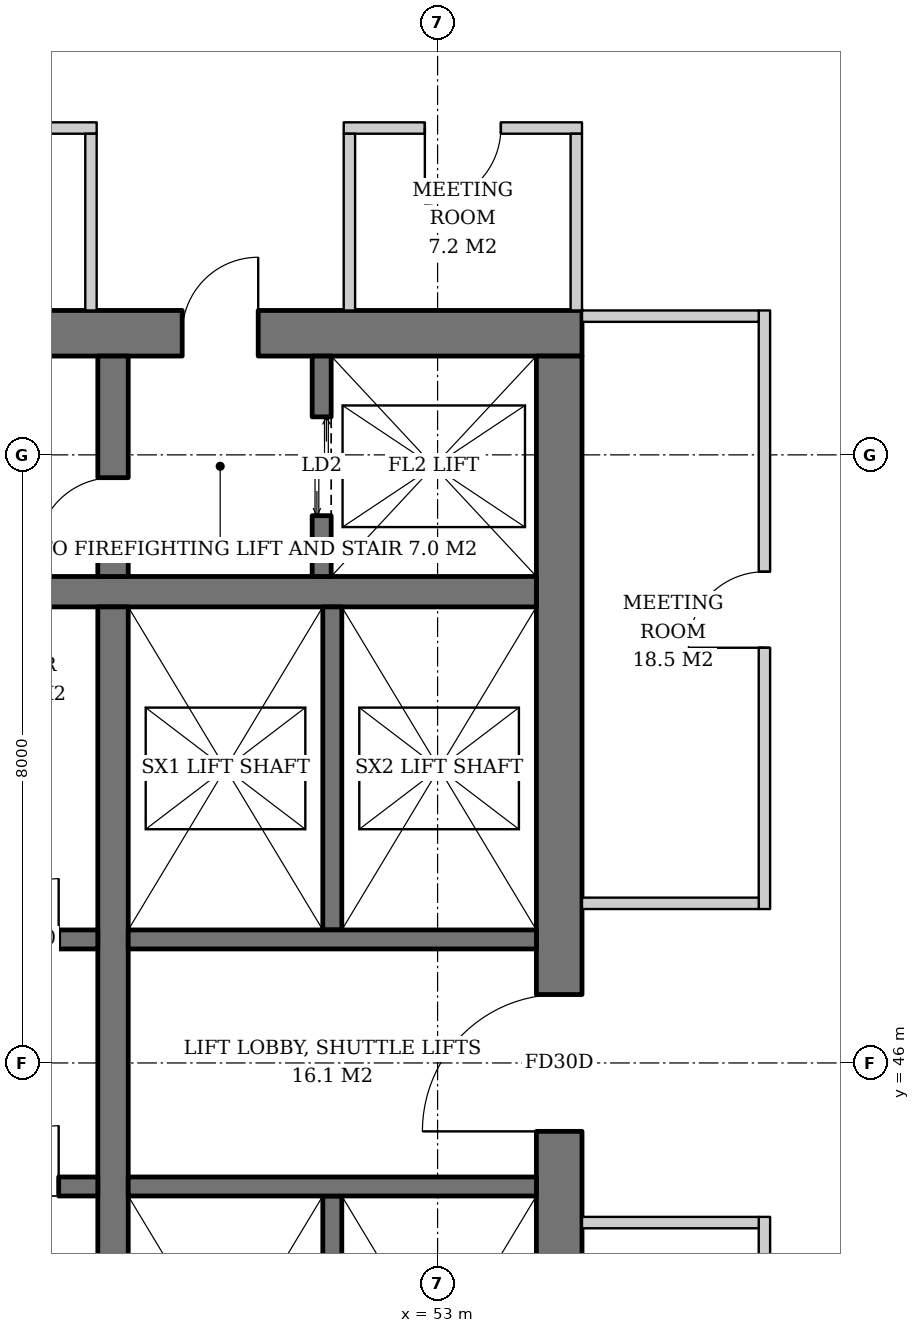
"""IFC4 building model, lengths in metres.
Left out: names, types, materials, properties, quantities, classifications, styles, units other than length and angle.
Written with IfcOpenShell. Run it as: python <this file> out.ifc"""

import sys

from ifc_helpers import new_model, si_unit, direction, frame, frame_2d, origin, place, context, subcontext, project, spatial, rectangle, extrude, element, fill, save


model = new_model("IFC4")
c1 = context("Model", 3, precision=1e-05, world=origin(), true_north=direction((0.0, 1.0)))
c2 = subcontext(c1, "Body", "Model", "MODEL_VIEW")
j1 = project(units=[si_unit("LENGTHUNIT", "METRE"), si_unit("PLANEANGLEUNIT", "RADIAN")], contexts=[c1])
p1 = place(None, origin())
s1 = spatial("IfcSite", under=j1, at=p1, CompositionType="ELEMENT")
p2 = place(p1, origin())
s2 = spatial("IfcBuilding", under=s1, at=p2, CompositionType="ELEMENT")
p3 = place(p2, frame((0.0, 0.0, 173.0)))
s3 = spatial("IfcBuildingStorey", under=s2, at=p3, CompositionType="ELEMENT", Elevation=173.0)
p4 = place(p3, frame((35.1, 55.6, 0.0), z_axis=(0.0, 0.0, 1.0), x_axis=(1.0, 0.0, 0.0)))
e1 = element("IfcWall", 1, at=p4, inside=s3, PredefinedType="SHEAR", context=c2, shape_type="SweptSolid", body=[
    extrude(rectangle(XDim=19.8, YDim=0.6, at=frame_2d((9.9, 0.0))), origin(), (0.0, 0.0, 1.0), 3.8),
])
p5 = place(p4, frame((14.54, 0.0, 0.0)))
e2 = element("IfcOpeningElement", 2, at=p5, cuts=e1, PredefinedType="OPENING", context=c2, shape_type="SweptSolid", body=[
    extrude(rectangle(XDim=1.0, YDim=2.1, at=frame_2d((0.5, 1.05))), frame((0.0, 0.31, 0.0), z_axis=(0.0, -1.0, 0.0), x_axis=(1.0, 0.0, 0.0)), (0.0, 0.0, 1.0), 0.62),
])
p6 = place(p4, frame((0.931, 0.0, 0.0)))
e3 = element("IfcOpeningElement", 3, at=p6, cuts=e1, PredefinedType="OPENING", context=c2, shape_type="SweptSolid", body=[
    extrude(rectangle(XDim=1.0, YDim=2.1, at=frame_2d((0.5, 1.05))), frame((0.0, 0.31, 0.0), z_axis=(0.0, -1.0, 0.0), x_axis=(1.0, 0.0, 0.0)), (0.0, 0.0, 1.0), 0.62),
])
p7 = place(p4, frame((2.448, 0.0, 0.0)))
e4 = element("IfcOpeningElement", 4, at=p7, cuts=e1, PredefinedType="OPENING", context=c2, shape_type="SweptSolid", body=[
    extrude(rectangle(XDim=1.0, YDim=2.1, at=frame_2d((0.5, 1.05))), frame((0.0, 0.31, 0.0), z_axis=(0.0, -1.0, 0.0), x_axis=(1.0, 0.0, 0.0)), (0.0, 0.0, 1.0), 0.62),
])
p8 = place(p4, frame((3.983, 0.0, 0.0)))
e5 = element("IfcOpeningElement", 5, at=p8, cuts=e1, PredefinedType="OPENING", context=c2, shape_type="SweptSolid", body=[
    extrude(rectangle(XDim=1.0, YDim=2.1, at=frame_2d((0.5, 1.05))), frame((0.0, 0.31, 0.0), z_axis=(0.0, -1.0, 0.0), x_axis=(1.0, 0.0, 0.0)), (0.0, 0.0, 1.0), 0.62),
])
p9 = place(p3, frame((54.6, 36.7, 0.0), z_axis=(0.0, 0.0, 1.0), x_axis=(0.0, 1.0, 0.0)))
e6 = element("IfcWall", 6, at=p9, inside=s3, PredefinedType="SHEAR", context=c2, shape_type="SweptSolid", body=[
    extrude(rectangle(XDim=18.6, YDim=0.6, at=frame_2d((9.3, 0.0))), origin(), (0.0, 0.0, 1.0), 3.8),
])
p10 = place(p9, frame((8.4, 0.0, 0.0)))
e7 = element("IfcOpeningElement", 7, at=p10, cuts=e6, PredefinedType="OPENING", context=c2, shape_type="SweptSolid", body=[
    extrude(rectangle(XDim=1.8, YDim=2.4, at=frame_2d((0.9, 1.2))), frame((0.0, 0.31, 0.0), z_axis=(0.0, -1.0, 0.0), x_axis=(1.0, 0.0, 0.0)), (0.0, 0.0, 1.0), 0.62),
])
p11 = place(p3, frame((35.7, 52.2, 0.0), z_axis=(0.0, 0.0, 1.0), x_axis=(1.0, 0.0, 0.0)))
e8 = element("IfcWall", 8, at=p11, inside=s3, PredefinedType="SHEAR", context=c2, shape_type="SweptSolid", body=[
    extrude(rectangle(XDim=18.6, YDim=0.4, at=frame_2d((9.3, 0.0))), origin(), (0.0, 0.0, 1.0), 3.8),
])
p12 = place(p3, frame((48.73, 40.0, 0.0), z_axis=(0.0, 0.0, 1.0), x_axis=(0.0, 1.0, 0.0)))
e9 = element("IfcWall", 9, at=p12, inside=s3, PredefinedType="SHEAR", context=c2, shape_type="SweptSolid", body=[
    extrude(rectangle(XDim=12.0, YDim=0.4, at=frame_2d((6.0, 0.0))), origin(), (0.0, 0.0, 1.0), 3.8),
])
p13 = place(p3, frame((48.73, 52.4, 0.0), z_axis=(0.0, 0.0, 1.0), x_axis=(0.0, 1.0, 0.0)))
e10 = element("IfcWall", 10, at=p13, inside=s3, PredefinedType="SHEAR", context=c2, shape_type="SweptSolid", body=[
    extrude(rectangle(XDim=2.9, YDim=0.4, at=frame_2d((1.45, 0.0))), origin(), (0.0, 0.0, 1.0), 3.8),
])
p14 = place(p13, frame((0.3, 0.0, 0.0)))
e11 = element("IfcOpeningElement", 11, at=p14, cuts=e10, PredefinedType="OPENING", context=c2, shape_type="SweptSolid", body=[
    extrude(rectangle(XDim=1.0, YDim=2.1, at=frame_2d((0.5, 1.05))), frame((0.0, 0.21, 0.0), z_axis=(0.0, -1.0, 0.0), x_axis=(1.0, 0.0, 0.0)), (0.0, 0.0, 1.0), 0.42),
])
p15 = place(p3, frame((51.475, 52.4, 0.0), z_axis=(0.0, 0.0, 1.0), x_axis=(0.0, 1.0, 0.0)))
e12 = element("IfcWall", 12, at=p15, inside=s3, PredefinedType="SHEAR", context=c2, shape_type="SweptSolid", body=[
    extrude(rectangle(XDim=2.9, YDim=0.25, at=frame_2d((1.45, 0.0))), origin(), (0.0, 0.0, 1.0), 3.8),
])
p16 = place(p15, frame((0.8, 0.0, 0.0)))
e13 = element("IfcOpeningElement", 13, at=p16, cuts=e12, PredefinedType="OPENING", context=c2, shape_type="SweptSolid", body=[
    extrude(rectangle(XDim=1.3, YDim=2.2, at=frame_2d((0.65, 1.1))), frame((0.0, 0.135, 0.0), z_axis=(0.0, -1.0, 0.0), x_axis=(1.0, 0.0, 0.0)), (0.0, 0.0, 1.0), 0.27),
])
p17 = place(p3, frame((35.7, 47.625, 0.0), z_axis=(0.0, 0.0, 1.0), x_axis=(1.0, 0.0, 0.0)))
e14 = element("IfcWall", 14, at=p17, inside=s3, PredefinedType="SHEAR", context=c2, shape_type="SweptSolid", body=[
    extrude(rectangle(XDim=12.83, YDim=0.25, at=frame_2d((6.415, 0.0))), origin(), (0.0, 0.0, 1.0), 3.8),
])
p18 = place(p17, frame((0.7, 0.0, 0.0)))
e15 = element("IfcOpeningElement", 15, at=p18, cuts=e14, PredefinedType="OPENING", context=c2, shape_type="SweptSolid", body=[
    extrude(rectangle(XDim=1.1, YDim=2.2, at=frame_2d((0.55, 1.1))), frame((0.0, 0.135, 0.0), z_axis=(0.0, -1.0, 0.0), x_axis=(1.0, 0.0, 0.0)), (0.0, 0.0, 1.0), 0.27),
])
p19 = place(p17, frame((3.45, 0.0, 0.0)))
e16 = element("IfcOpeningElement", 16, at=p19, cuts=e14, PredefinedType="OPENING", context=c2, shape_type="SweptSolid", body=[
    extrude(rectangle(XDim=1.1, YDim=2.2, at=frame_2d((0.55, 1.1))), frame((0.0, 0.135, 0.0), z_axis=(0.0, -1.0, 0.0), x_axis=(1.0, 0.0, 0.0)), (0.0, 0.0, 1.0), 0.27),
])
p20 = place(p17, frame((6.2, 0.0, 0.0)))
e17 = element("IfcOpeningElement", 17, at=p20, cuts=e14, PredefinedType="OPENING", context=c2, shape_type="SweptSolid", body=[
    extrude(rectangle(XDim=1.1, YDim=2.2, at=frame_2d((0.55, 1.1))), frame((0.0, 0.135, 0.0), z_axis=(0.0, -1.0, 0.0), x_axis=(1.0, 0.0, 0.0)), (0.0, 0.0, 1.0), 0.27),
])
p21 = place(p17, frame((9.0, 0.0, 0.0)))
e18 = element("IfcOpeningElement", 18, at=p21, cuts=e14, PredefinedType="OPENING", context=c2, shape_type="SweptSolid", body=[
    extrude(rectangle(XDim=1.0, YDim=2.1, at=frame_2d((0.5, 1.05))), frame((0.0, 0.135, 0.0), z_axis=(0.0, -1.0, 0.0), x_axis=(1.0, 0.0, 0.0)), (0.0, 0.0, 1.0), 0.27),
])
p22 = place(p17, frame((11.515, 0.0, 0.0)))
e19 = element("IfcOpeningElement", 19, at=p22, cuts=e14, PredefinedType="OPENING", context=c2, shape_type="SweptSolid", body=[
    extrude(rectangle(XDim=0.8, YDim=2.0, at=frame_2d((0.4, 1.0))), frame((0.0, 0.135, 0.0), z_axis=(0.0, -1.0, 0.0), x_axis=(1.0, 0.0, 0.0)), (0.0, 0.0, 1.0), 0.27),
])
p23 = place(p3, frame((35.7, 44.375, 0.0), z_axis=(0.0, 0.0, 1.0), x_axis=(1.0, 0.0, 0.0)))
e20 = element("IfcWall", 20, at=p23, inside=s3, PredefinedType="SHEAR", context=c2, shape_type="SweptSolid", body=[
    extrude(rectangle(XDim=12.83, YDim=0.25, at=frame_2d((6.415, 0.0))), origin(), (0.0, 0.0, 1.0), 3.8),
])
p24 = place(p23, frame((0.7, 0.0, 0.0)))
e21 = element("IfcOpeningElement", 21, at=p24, cuts=e20, PredefinedType="OPENING", context=c2, shape_type="SweptSolid", body=[
    extrude(rectangle(XDim=1.1, YDim=2.2, at=frame_2d((0.55, 1.1))), frame((0.0, 0.135, 0.0), z_axis=(0.0, -1.0, 0.0), x_axis=(1.0, 0.0, 0.0)), (0.0, 0.0, 1.0), 0.27),
])
p25 = place(p23, frame((3.45, 0.0, 0.0)))
e22 = element("IfcOpeningElement", 22, at=p25, cuts=e20, PredefinedType="OPENING", context=c2, shape_type="SweptSolid", body=[
    extrude(rectangle(XDim=1.1, YDim=2.2, at=frame_2d((0.55, 1.1))), frame((0.0, 0.135, 0.0), z_axis=(0.0, -1.0, 0.0), x_axis=(1.0, 0.0, 0.0)), (0.0, 0.0, 1.0), 0.27),
])
p26 = place(p23, frame((6.2, 0.0, 0.0)))
e23 = element("IfcOpeningElement", 23, at=p26, cuts=e20, PredefinedType="OPENING", context=c2, shape_type="SweptSolid", body=[
    extrude(rectangle(XDim=1.1, YDim=2.2, at=frame_2d((0.55, 1.1))), frame((0.0, 0.135, 0.0), z_axis=(0.0, -1.0, 0.0), x_axis=(1.0, 0.0, 0.0)), (0.0, 0.0, 1.0), 0.27),
])
p27 = place(p23, frame((9.0, 0.0, 0.0)))
e24 = element("IfcOpeningElement", 24, at=p27, cuts=e20, PredefinedType="OPENING", context=c2, shape_type="SweptSolid", body=[
    extrude(rectangle(XDim=1.0, YDim=2.1, at=frame_2d((0.5, 1.05))), frame((0.0, 0.135, 0.0), z_axis=(0.0, -1.0, 0.0), x_axis=(1.0, 0.0, 0.0)), (0.0, 0.0, 1.0), 0.27),
])
p28 = place(p23, frame((11.515, 0.0, 0.0)))
e25 = element("IfcOpeningElement", 25, at=p28, cuts=e20, PredefinedType="OPENING", context=c2, shape_type="SweptSolid", body=[
    extrude(rectangle(XDim=0.8, YDim=2.0, at=frame_2d((0.4, 1.0))), frame((0.0, 0.135, 0.0), z_axis=(0.0, -1.0, 0.0), x_axis=(1.0, 0.0, 0.0)), (0.0, 0.0, 1.0), 0.27),
])
p29 = place(p3, frame((51.615, 47.75, 0.0), z_axis=(0.0, 0.0, 1.0), x_axis=(0.0, 1.0, 0.0)))
e26 = element("IfcWall", 26, at=p29, inside=s3, PredefinedType="SHEAR", context=c2, shape_type="SweptSolid", body=[
    extrude(rectangle(XDim=4.25, YDim=0.25, at=frame_2d((2.125, 0.0))), origin(), (0.0, 0.0, 1.0), 3.8),
])
p30 = place(p3, frame((48.93, 47.625, 0.0), z_axis=(0.0, 0.0, 1.0), x_axis=(1.0, 0.0, 0.0)))
e27 = element("IfcWall", 27, at=p30, inside=s3, PredefinedType="SHEAR", context=c2, shape_type="SweptSolid", body=[
    extrude(rectangle(XDim=5.37, YDim=0.25, at=frame_2d((2.685, 0.0))), origin(), (0.0, 0.0, 1.0), 3.8),
])
p31 = place(p3, frame((51.615, 44.25, 0.0), z_axis=(0.0, 0.0, 1.0), x_axis=(0.0, -1.0, 0.0)))
e28 = element("IfcWall", 28, at=p31, inside=s3, PredefinedType="SHEAR", context=c2, shape_type="SweptSolid", body=[
    extrude(rectangle(XDim=4.25, YDim=0.25, at=frame_2d((2.125, 0.0))), origin(), (0.0, 0.0, 1.0), 3.8),
])
p32 = place(p3, frame((48.93, 44.375, 0.0), z_axis=(0.0, 0.0, 1.0), x_axis=(1.0, 0.0, 0.0)))
e29 = element("IfcWall", 29, at=p32, inside=s3, PredefinedType="SHEAR", context=c2, shape_type="SweptSolid", body=[
    extrude(rectangle(XDim=5.37, YDim=0.25, at=frame_2d((2.685, 0.0))), origin(), (0.0, 0.0, 1.0), 3.8),
])
p33 = place(p3, frame((57.3, 36.1, 0.0), z_axis=(0.0, 0.0, 1.0), x_axis=(0.0, 1.0, 0.0)))
e30 = element("IfcWall", 30, at=p33, inside=s3, PredefinedType="PARTITIONING", context=c2, shape_type="SweptSolid", body=[
    extrude(rectangle(XDim=7.875, YDim=0.15, at=frame_2d((3.938, 0.0))), origin(), (0.0, 0.0, 1.0), 2.867),
])
p34 = place(p33, frame((3.438, 0.0, 0.0)))
e31 = element("IfcOpeningElement", 31, at=p34, cuts=e30, PredefinedType="OPENING", context=c2, shape_type="SweptSolid", body=[
    extrude(rectangle(XDim=1.0, YDim=2.1, at=frame_2d((0.5, 1.05))), frame((0.0, 0.085, 0.0), z_axis=(0.0, -1.0, 0.0), x_axis=(1.0, 0.0, 0.0)), (0.0, 0.0, 1.0), 0.17),
])
p35 = place(p3, frame((54.9, 43.9, 0.0), z_axis=(0.0, 0.0, 1.0), x_axis=(1.0, 0.0, 0.0)))
e32 = element("IfcWall", 32, at=p35, inside=s3, PredefinedType="PARTITIONING", context=c2, shape_type="SweptSolid", body=[
    extrude(rectangle(XDim=2.325, YDim=0.15, at=frame_2d((1.163, 0.0))), origin(), (0.0, 0.0, 1.0), 3.62),
])
p36 = place(p3, frame((57.3, 48.025, 0.0), z_axis=(0.0, 0.0, 1.0), x_axis=(0.0, 1.0, 0.0)))
e33 = element("IfcWall", 33, at=p36, inside=s3, PredefinedType="PARTITIONING", context=c2, shape_type="SweptSolid", body=[
    extrude(rectangle(XDim=7.875, YDim=0.15, at=frame_2d((3.938, 0.0))), origin(), (0.0, 0.0, 1.0), 2.867),
])
p37 = place(p36, frame((3.438, 0.0, 0.0)))
e34 = element("IfcOpeningElement", 34, at=p37, cuts=e33, PredefinedType="OPENING", context=c2, shape_type="SweptSolid", body=[
    extrude(rectangle(XDim=1.0, YDim=2.1, at=frame_2d((0.5, 1.05))), frame((0.0, 0.085, 0.0), z_axis=(0.0, -1.0, 0.0), x_axis=(1.0, 0.0, 0.0)), (0.0, 0.0, 1.0), 0.17),
])
for number, where, z_axis, x_axis in (
    (35, (54.9, 48.1, 0.0), (0.0, 0.0, 1.0), (1.0, 0.0, 0.0)),
    (36, (54.9, 55.825, 0.0), (0.0, 0.0, 1.0), (1.0, 0.0, 0.0)),
):
    element("IfcWall", number, at=place(p3, frame(where, z_axis=z_axis, x_axis=x_axis)), inside=s3, PredefinedType="PARTITIONING", context=c2, shape_type="SweptSolid", body=[
        extrude(rectangle(XDim=2.325, YDim=0.15, at=frame_2d((1.163, 0.0))), origin(), (0.0, 0.0, 1.0), 3.62),
    ])
p38 = place(p3, frame((54.9, 58.3, 0.0), z_axis=(0.0, 0.0, 1.0), x_axis=(-1.0, 0.0, 0.0)))
e37 = element("IfcWall", 37, at=p38, inside=s3, PredefinedType="PARTITIONING", context=c2, shape_type="SweptSolid", body=[
    extrude(rectangle(XDim=3.135, YDim=0.15, at=frame_2d((1.567, 0.0))), origin(), (0.0, 0.0, 1.0), 2.92),
])
p39 = place(p38, frame((1.067, 0.0, 0.0)))
e38 = element("IfcOpeningElement", 38, at=p39, cuts=e37, PredefinedType="OPENING", context=c2, shape_type="SweptSolid", body=[
    extrude(rectangle(XDim=1.0, YDim=2.1, at=frame_2d((0.5, 1.05))), frame((0.0, 0.085, 0.0), z_axis=(0.0, -1.0, 0.0), x_axis=(1.0, 0.0, 0.0)), (0.0, 0.0, 1.0), 0.17),
])
p40 = place(p3, frame((54.825, 55.9, 0.0), z_axis=(0.0, 0.0, 1.0), x_axis=(0.0, 1.0, 0.0)))
e39 = element("IfcWall", 39, at=p40, inside=s3, PredefinedType="PARTITIONING", context=c2, shape_type="SweptSolid", body=[
    extrude(rectangle(XDim=2.325, YDim=0.15, at=frame_2d((1.163, 0.0))), origin(), (0.0, 0.0, 1.0), 2.867),
])
p41 = place(p3, frame((51.84, 55.9, 0.0), z_axis=(0.0, 0.0, 1.0), x_axis=(0.0, 1.0, 0.0)))
e40 = element("IfcWall", 40, at=p41, inside=s3, PredefinedType="PARTITIONING", context=c2, shape_type="SweptSolid", body=[
    extrude(rectangle(XDim=2.325, YDim=0.15, at=frame_2d((1.163, 0.0))), origin(), (0.0, 0.0, 1.0), 3.62),
])
p42 = place(p3, frame((48.515, 58.3, 0.0), z_axis=(0.0, 0.0, 1.0), x_axis=(-1.0, 0.0, 0.0)))
e41 = element("IfcWall", 41, at=p42, inside=s3, PredefinedType="PARTITIONING", context=c2, shape_type="SweptSolid", body=[
    extrude(rectangle(XDim=7.307, YDim=0.15, at=frame_2d((3.654, 0.0))), origin(), (0.0, 0.0, 1.0), 2.867),
])
p43 = place(p42, frame((3.154, 0.0, 0.0)))
e42 = element("IfcOpeningElement", 42, at=p43, cuts=e41, PredefinedType="OPENING", context=c2, shape_type="SweptSolid", body=[
    extrude(rectangle(XDim=1.0, YDim=2.1, at=frame_2d((0.5, 1.05))), frame((0.0, 0.085, 0.0), z_axis=(0.0, -1.0, 0.0), x_axis=(1.0, 0.0, 0.0)), (0.0, 0.0, 1.0), 0.17),
])
p44 = place(p3, frame((48.44, 55.9, 0.0), z_axis=(0.0, 0.0, 1.0), x_axis=(0.0, 1.0, 0.0)))
e43 = element("IfcWall", 43, at=p44, inside=s3, PredefinedType="PARTITIONING", context=c2, shape_type="SweptSolid", body=[
    extrude(rectangle(XDim=2.325, YDim=0.15, at=frame_2d((1.163, 0.0))), origin(), (0.0, 0.0, 1.0), 3.62),
])
p45 = place(p16, origin())
e44 = element("IfcDoor", 44, at=p45, inside=s3, OperationType="DOUBLE_DOOR_SLIDING", PredefinedType="DOOR", context=c2, shape_type="SweptSolid", body=[
    extrude(rectangle(XDim=1.3, YDim=2.2, at=frame_2d((0.65, 1.1))), frame((0.0, 0.025, 0.0), z_axis=(0.0, -1.0, 0.0), x_axis=(1.0, 0.0, 0.0)), (0.0, 0.0, 1.0), 0.05),
])
fill(e13, e44)
p46 = place(p22, origin())
e45 = element("IfcDoor", 45, at=p46, inside=s3, OperationType="SINGLE_SWING_RIGHT", PredefinedType="DOOR", context=c2, shape_type="SweptSolid", body=[
    extrude(rectangle(XDim=0.8, YDim=2.0, at=frame_2d((0.4, 1.0))), frame((0.0, 0.025, 0.0), z_axis=(0.0, -1.0, 0.0), x_axis=(1.0, 0.0, 0.0)), (0.0, 0.0, 1.0), 0.05),
])
fill(e19, e45)
p47 = place(p28, origin())
e46 = element("IfcDoor", 46, at=p47, inside=s3, OperationType="SINGLE_SWING_RIGHT", PredefinedType="DOOR", context=c2, shape_type="SweptSolid", body=[
    extrude(rectangle(XDim=0.8, YDim=2.0, at=frame_2d((0.4, 1.0))), frame((0.0, 0.025, 0.0), z_axis=(0.0, -1.0, 0.0), x_axis=(1.0, 0.0, 0.0)), (0.0, 0.0, 1.0), 0.05),
])
fill(e25, e46)
p48 = place(p14, origin())
e47 = element("IfcDoor", 47, at=p48, inside=s3, OperationType="SINGLE_SWING_LEFT", PredefinedType="DOOR", context=c2, shape_type="SweptSolid", body=[
    extrude(rectangle(XDim=1.0, YDim=2.1, at=frame_2d((0.5, 1.05))), frame((0.0, 0.025, 0.0), z_axis=(0.0, -1.0, 0.0), x_axis=(1.0, 0.0, 0.0)), (0.0, 0.0, 1.0), 0.05),
])
fill(e11, e47)
p49 = place(p5, origin())
e48 = element("IfcDoor", 48, at=p49, inside=s3, OperationType="SINGLE_SWING_RIGHT", PredefinedType="DOOR", context=c2, shape_type="SweptSolid", body=[
    extrude(rectangle(XDim=1.0, YDim=2.1, at=frame_2d((0.5, 1.05))), frame((0.0, 0.025, 0.0), z_axis=(0.0, -1.0, 0.0), x_axis=(1.0, 0.0, 0.0)), (0.0, 0.0, 1.0), 0.05),
])
fill(e2, e48)
p50 = place(p10, origin())
e49 = element("IfcDoor", 49, at=p50, inside=s3, OperationType="DOUBLE_DOOR_SINGLE_SWING", PredefinedType="DOOR", context=c2, shape_type="SweptSolid", body=[
    extrude(rectangle(XDim=1.8, YDim=2.4, at=frame_2d((0.9, 1.2))), frame((0.0, 0.025, 0.0), z_axis=(0.0, -1.0, 0.0), x_axis=(1.0, 0.0, 0.0)), (0.0, 0.0, 1.0), 0.05),
])
fill(e7, e49)
p51 = place(p37, origin())
e50 = element("IfcDoor", 50, at=p51, inside=s3, OperationType="SINGLE_SWING_LEFT", PredefinedType="DOOR", context=c2, shape_type="SweptSolid", body=[
    extrude(rectangle(XDim=1.0, YDim=2.1, at=frame_2d((0.5, 1.05))), frame((0.0, 0.025, 0.0), z_axis=(0.0, -1.0, 0.0), x_axis=(1.0, 0.0, 0.0)), (0.0, 0.0, 1.0), 0.05),
])
fill(e34, e50)
p52 = place(p39, origin())
e51 = element("IfcDoor", 51, at=p52, inside=s3, OperationType="SINGLE_SWING_RIGHT", PredefinedType="DOOR", context=c2, shape_type="SweptSolid", body=[
    extrude(rectangle(XDim=1.0, YDim=2.1, at=frame_2d((0.5, 1.05))), frame((0.0, 0.025, 0.0), z_axis=(0.0, -1.0, 0.0), x_axis=(1.0, 0.0, 0.0)), (0.0, 0.0, 1.0), 0.05),
])
fill(e38, e51)
save(model, sys.argv[1])
